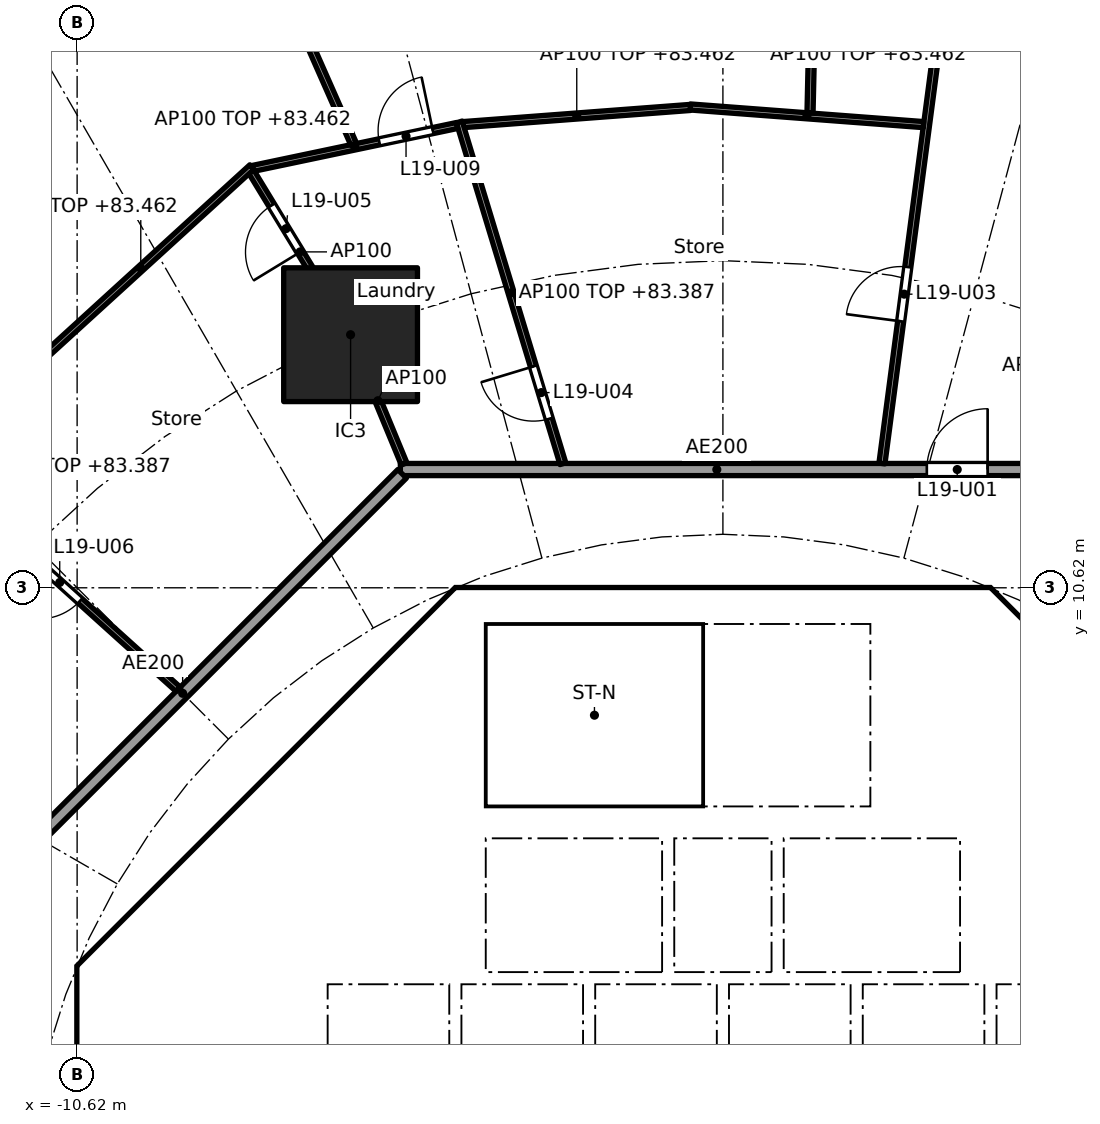
"""IFC4 building model, lengths in metres.
Left out: names, types, materials, properties, quantities, classifications, styles, units other than length and angle.
Written with IfcOpenShell. Run it as: python <this file> out.ifc"""

import sys

from ifc_helpers import new_model, si_unit, direction, frame, frame_2d, origin, origin_2d, place, context, subcontext, project, spatial, polyline, rectangle, outline, extrude, element, fill, save


model = new_model("IFC4")
c1 = context("Model", 3, precision=1e-05, world=origin(), true_north=direction((0.0, 1.0)))
c2 = subcontext(c1, "Body", "Model", "MODEL_VIEW")
j1 = project(units=[si_unit("LENGTHUNIT", "METRE"), si_unit("PLANEANGLEUNIT", "RADIAN")], contexts=[c1])
p1 = place(None, origin())
s1 = spatial("IfcSite", under=j1, at=p1, CompositionType="ELEMENT")
p2 = place(p1, origin())
s2 = spatial("IfcBuilding", under=s1, at=p2, CompositionType="ELEMENT")
p3 = place(p2, frame((0.0, 0.0, 80.7)))
s3 = spatial("IfcBuildingStorey", under=s2, at=p3, CompositionType="ELEMENT", Elevation=80.7)
p4 = place(p3, frame((-6.123, 14.782, 0.0), z_axis=(0.0, 0.0, 1.0), x_axis=(1.0, 0.0, 0.0)))
e1 = element("IfcColumn", 1, at=p4, inside=s3, PredefinedType="COLUMN", context=c2, shape_type="SweptSolid", body=[
    extrude(rectangle(XDim=2.2, YDim=2.2, at=origin_2d()), origin(), (0.0, 0.0, 1.0), 3.7),
])
p5 = place(p3, frame((9.988, 4.613, 0.0), z_axis=(0.0, 0.0, 1.0), x_axis=(-0.707106781187, 0.707106781187, 0.0)))
e2 = element("IfcWall", 2, at=p5, inside=s3, PredefinedType="SHEAR", context=c2, shape_type="SweptSolid", body=[
    extrude(rectangle(XDim=7.602, YDim=0.6, at=frame_2d((3.801, 0.0))), origin(), (0.0, 0.0, 1.0), 3.44),
])
p6 = place(p5, frame((3.201, 0.0, 0.0)))
e3 = element("IfcOpeningElement", 3, at=p6, cuts=e2, PredefinedType="OPENING", context=c2, shape_type="SweptSolid", body=[
    extrude(rectangle(XDim=1.2, YDim=2.1, at=frame_2d((0.6, 1.05))), frame((0.0, 0.31, 0.0), z_axis=(0.0, -1.0, 0.0), x_axis=(1.0, 0.0, 0.0)), (0.0, 0.0, 1.0), 0.62),
])
p7 = place(p3, frame((-4.613, 9.988, 0.0), z_axis=(0.0, 0.0, 1.0), x_axis=(-0.707106781187, -0.707106781187, 0.0)))
e4 = element("IfcWall", 4, at=p7, inside=s3, PredefinedType="SHEAR", context=c2, shape_type="SweptSolid", body=[
    extrude(rectangle(XDim=7.602, YDim=0.6, at=frame_2d((3.801, 0.0))), origin(), (0.0, 0.0, 1.0), 3.44),
])
p8 = place(p7, frame((0.351, 0.0, 0.0)))
e5 = element("IfcOpeningElement", 5, at=p8, cuts=e4, PredefinedType="OPENING", context=c2, shape_type="SweptSolid", body=[
    extrude(rectangle(XDim=1.1, YDim=2.1, at=frame_2d((0.55, 1.05))), frame((0.0, 0.31, 0.0), z_axis=(0.0, -1.0, 0.0), x_axis=(1.0, 0.0, 0.0)), (0.0, 0.0, 1.0), 0.62),
])
p9 = place(p3, frame((-10.325, 3.801, 0.0), z_axis=(0.0, 0.0, 1.0), x_axis=(0.0, -1.0, 0.0)))
e6 = element("IfcWall", 6, at=p9, inside=s3, PredefinedType="SHEAR", context=c2, shape_type="SweptSolid", body=[
    extrude(rectangle(XDim=7.602, YDim=0.6, at=frame_2d((3.801, 0.0))), origin(), (0.0, 0.0, 1.0), 3.44),
])
p10 = place(p9, frame((0.651, 0.0, 0.0)))
e7 = element("IfcOpeningElement", 7, at=p10, cuts=e6, PredefinedType="OPENING", context=c2, shape_type="SweptSolid", body=[
    extrude(rectangle(XDim=1.5, YDim=2.1, at=frame_2d((0.75, 1.05))), frame((0.0, 0.31, 0.0), z_axis=(0.0, -1.0, 0.0), x_axis=(1.0, 0.0, 0.0)), (0.0, 0.0, 1.0), 0.62),
])
p11 = place(p9, frame((5.451, 0.0, 0.0)))
e8 = element("IfcOpeningElement", 8, at=p11, cuts=e6, PredefinedType="OPENING", context=c2, shape_type="SweptSolid", body=[
    extrude(rectangle(XDim=1.5, YDim=2.1, at=frame_2d((0.75, 1.05))), frame((0.0, 0.31, 0.0), z_axis=(0.0, -1.0, 0.0), x_axis=(1.0, 0.0, 0.0)), (0.0, 0.0, 1.0), 0.62),
])
p12 = place(p3, frame((-5.8, 4.3, 0.0), z_axis=(0.0, 0.0, 1.0), x_axis=(0.0, 1.0, 0.0)))
e9 = element("IfcWall", 9, at=p12, inside=s3, PredefinedType="PARTITIONING", context=c2, shape_type="SweptSolid", body=[
    extrude(rectangle(XDim=3.927, YDim=0.15, at=frame_2d((1.963, 0.0))), origin(), (0.0, 0.0, 1.0), 3.44),
])
p13 = place(p12, frame((1.551, 0.0, 0.0)))
e10 = element("IfcOpeningElement", 10, at=p13, cuts=e9, PredefinedType="OPENING", context=c2, shape_type="SweptSolid", body=[
    extrude(rectangle(XDim=0.9, YDim=2.1, at=frame_2d((0.45, 1.05))), frame((0.0, 0.085, 0.0), z_axis=(0.0, -1.0, 0.0), x_axis=(1.0, 0.0, 0.0)), (0.0, 0.0, 1.0), 0.17),
])
p14 = place(p3, frame((4.0, 4.3, 0.0), z_axis=(0.0, 0.0, 1.0), x_axis=(0.0, 1.0, 0.0)))
e11 = element("IfcWall", 11, at=p14, inside=s3, PredefinedType="SOLIDWALL", context=c2, shape_type="SweptSolid", body=[
    extrude(rectangle(XDim=2.2, YDim=0.2, at=frame_2d((1.1, 0.0))), origin(), (0.0, 0.0, 1.0), 3.44),
])
p15 = place(p14, frame((0.55, 0.0, 0.0)))
e12 = element("IfcOpeningElement", 12, at=p15, cuts=e11, PredefinedType="OPENING", context=c2, shape_type="SweptSolid", body=[
    extrude(rectangle(XDim=1.1, YDim=2.1, at=frame_2d((0.55, 1.05))), frame((0.0, 0.11, 0.0), z_axis=(0.0, -1.0, 0.0), x_axis=(1.0, 0.0, 0.0)), (0.0, 0.0, 1.0), 0.22),
])
p16 = place(p3, frame((-4.0, 4.3, 0.0), z_axis=(0.0, 0.0, 1.0), x_axis=(0.0, 1.0, 0.0)))
e13 = element("IfcWall", 13, at=p16, inside=s3, PredefinedType="SOLIDWALL", context=c2, shape_type="SweptSolid", body=[
    extrude(rectangle(XDim=2.2, YDim=0.2, at=frame_2d((1.1, 0.0))), origin(), (0.0, 0.0, 1.0), 3.44),
])
p17 = place(p16, frame((0.55, 0.0, 0.0)))
e14 = element("IfcOpeningElement", 14, at=p17, cuts=e13, PredefinedType="OPENING", context=c2, shape_type="SweptSolid", body=[
    extrude(rectangle(XDim=1.1, YDim=2.1, at=frame_2d((0.55, 1.05))), frame((0.0, 0.11, 0.0), z_axis=(0.0, -1.0, 0.0), x_axis=(1.0, 0.0, 0.0)), (0.0, 0.0, 1.0), 0.22),
])
p18 = place(p3, frame((4.0, 7.025, 0.0), z_axis=(0.0, 0.0, 1.0), x_axis=(0.0, 1.0, 0.0)))
e15 = element("IfcWall", 15, at=p18, inside=s3, PredefinedType="SOLIDWALL", context=c2, shape_type="SweptSolid", body=[
    extrude(rectangle(XDim=3.0, YDim=0.2, at=frame_2d((1.5, 0.0))), origin(), (0.0, 0.0, 1.0), 3.44),
])
p19 = place(p18, frame((0.925, 0.0, 0.0)))
e16 = element("IfcOpeningElement", 16, at=p19, cuts=e15, PredefinedType="OPENING", context=c2, shape_type="SweptSolid", body=[
    extrude(rectangle(XDim=1.1, YDim=2.1, at=frame_2d((0.55, 1.05))), frame((0.0, 0.11, 0.0), z_axis=(0.0, -1.0, 0.0), x_axis=(1.0, 0.0, 0.0)), (0.0, 0.0, 1.0), 0.22),
])
p20 = place(p3, origin())
e17 = element("IfcWall", 17, at=p20, inside=s3, PredefinedType="SHEAR", context=c2, shape_type="SweptSolid", body=[
    extrude(outline(polyline([(-10.2, 4.825), (-9.776, 4.401), (-10.025, 4.152), (-10.025, 3.801), (-10.625, 3.801), (-10.625, 4.401), (-10.2, 4.825)])), origin(), (0.0, 0.0, 1.0), 3.44),
])
p21 = place(p3, origin())
e18 = element("IfcWall", 18, at=p21, inside=s3, PredefinedType="SHEAR", context=c2, shape_type="SweptSolid", body=[
    extrude(outline(polyline([(-4.152, 10.025), (-4.401, 9.776), (-4.825, 10.2), (-4.401, 10.625), (4.401, 10.625), (4.825, 10.2), (4.401, 9.776), (4.152, 10.025), (-4.152, 10.025)])), origin(), (0.0, 0.0, 1.0), 3.44),
])
for number, where, z_axis, x_axis in (
    (19, (-0.9, 4.3, 0.0), (0.0, 0.0, 1.0), (0.0, 1.0, 0.0)),
    (20, (0.9, 4.3, 0.0), (0.0, 0.0, 1.0), (0.0, 1.0, 0.0)),
):
    element("IfcWall", number, at=place(p3, frame(where, z_axis=z_axis, x_axis=x_axis)), inside=s3, PredefinedType="SOLIDWALL", context=c2, shape_type="SweptSolid", body=[
        extrude(rectangle(XDim=2.2, YDim=0.2, at=frame_2d((1.1, 0.0))), origin(), (0.0, 0.0, 1.0), 3.44),
    ])
p22 = place(p3, origin())
e21 = element("IfcWall", 21, at=p22, inside=s3, PredefinedType="SOLIDWALL", context=c2, shape_type="SweptSolid", body=[
    extrude(outline(polyline([(-6.5, 2.1), (-6.7, 2.1), (-6.7, 4.3), (6.7, 4.3), (6.7, 2.1), (6.5, 2.1), (6.5, 4.1), (4.5, 4.1), (4.5, 2.1), (4.3, 2.1), (4.3, 4.1), (2.3, 4.1), (2.3, 2.1), (2.1, 2.1), (2.1, 4.1), (0.1, 4.1), (0.1, 2.1), (-0.1, 2.1), (-0.1, 4.1), (-2.1, 4.1), (-2.1, 2.1), (-2.3, 2.1), (-2.3, 4.1), (-4.3, 4.1), (-4.3, 2.1), (-4.5, 2.1), (-4.5, 4.1), (-6.5, 4.1), (-6.5, 2.1)])), origin(), (0.0, 0.0, 1.0), 3.44),
])
p23 = place(p3, frame((-10.025, 4.0, 0.0), z_axis=(0.0, 0.0, 1.0), x_axis=(1.0, 0.0, 0.0)))
e22 = element("IfcWall", 22, at=p23, inside=s3, PredefinedType="PARTITIONING", context=c2, shape_type="SweptSolid", body=[
    extrude(rectangle(XDim=3.325, YDim=0.2, at=frame_2d((1.662, 0.0))), origin(), (0.0, 0.0, 1.0), 3.44),
])
p24 = place(p3, origin())
e23 = element("IfcWall", 23, at=p24, inside=s3, PredefinedType="SOLIDWALL", context=c2, shape_type="SweptSolid", body=[
    extrude(outline(polyline([(-3.9, 7.025), (-4.1, 7.025), (-4.1, 10.025), (-3.9, 10.025), (-3.9, 7.025)])), origin(), (0.0, 0.0, 1.0), 3.44),
])
p25 = place(p3, origin())
e24 = element("IfcWall", 24, at=p25, inside=s3, PredefinedType="SOLIDWALL", context=c2, shape_type="SweptSolid", body=[
    extrude(outline(polyline([(4.1, 6.5), (-4.1, 6.5), (-4.1, 7.025), (4.1, 7.025), (4.1, 6.5)])), origin(), (0.0, 0.0, 1.0), 3.44),
])
p26 = place(p3, frame((5.104, 12.565, 0.0), z_axis=(0.0, 0.0, 1.0), x_axis=(-1.0, 0.0, 0.0)))
e25 = element("IfcWall", 25, at=p26, inside=s3, PredefinedType="PARTITIONING", context=c2, shape_type="SweptSolid", body=[
    extrude(rectangle(XDim=10.409, YDim=0.2, at=frame_2d((5.205, 0.0))), origin(), (0.0, 0.0, 1.0), 3.44),
])
p27 = place(p26, frame((0.751, 0.0, 0.0)))
e26 = element("IfcOpeningElement", 26, at=p27, cuts=e25, PredefinedType="OPENING", context=c2, shape_type="SweptSolid", body=[
    extrude(rectangle(XDim=1.0, YDim=2.1, at=frame_2d((0.5, 1.05))), frame((0.0, 0.11, 0.0), z_axis=(0.0, -1.0, 0.0), x_axis=(1.0, 0.0, 0.0)), (0.0, 0.0, 1.0), 0.22),
])
p28 = place(p3, frame((-5.275, 12.494, 0.0), z_axis=(0.0, 0.0, 1.0), x_axis=(-0.707106781187, -0.707106781187, 0.0)))
e27 = element("IfcWall", 27, at=p28, inside=s3, PredefinedType="PARTITIONING", context=c2, shape_type="SweptSolid", body=[
    extrude(rectangle(XDim=10.209, YDim=0.2, at=frame_2d((5.104, 0.0))), origin(), (0.0, 0.0, 1.0), 3.44),
])
p29 = place(p3, frame((2.615, 12.664, 0.0), z_axis=(0.0, 0.0, 1.0), x_axis=(0.130614967904, 0.99143316979, 0.0)))
e28 = element("IfcWall", 28, at=p29, inside=s3, PredefinedType="PARTITIONING", context=c2, shape_type="SweptSolid", body=[
    extrude(rectangle(XDim=20.034, YDim=0.1, at=frame_2d((10.017, 0.0))), origin(), (0.0, 0.0, 1.0), 2.687),
])
p30 = place(p29, frame((2.359, 0.0, 0.0)))
e29 = element("IfcOpeningElement", 29, at=p30, cuts=e28, PredefinedType="OPENING", context=c2, shape_type="SweptSolid", body=[
    extrude(rectangle(XDim=0.9, YDim=2.1, at=frame_2d((0.45, 1.05))), frame((0.0, 0.06, 0.0), z_axis=(0.0, -1.0, 0.0), x_axis=(1.0, 0.0, 0.0)), (0.0, 0.0, 1.0), 0.12),
])
p31 = place(p29, frame((8.873, 0.0, 0.0)))
e30 = element("IfcOpeningElement", 30, at=p31, cuts=e28, PredefinedType="OPENING", context=c2, shape_type="SweptSolid", body=[
    extrude(rectangle(XDim=0.9, YDim=2.1, at=frame_2d((0.45, 1.05))), frame((0.0, 0.06, 0.0), z_axis=(0.0, -1.0, 0.0), x_axis=(1.0, 0.0, 0.0)), (0.0, 0.0, 1.0), 0.12),
])
p32 = place(p3, frame((3.299, 18.237, 0.0), z_axis=(0.0, 0.0, 1.0), x_axis=(-0.997152243414, 0.075414875552, 0.0)))
e31 = element("IfcWall", 31, at=p32, inside=s3, PredefinedType="PARTITIONING", context=c2, shape_type="SweptSolid", body=[
    extrude(rectangle(XDim=3.846, YDim=0.1, at=frame_2d((1.923, 0.0))), origin(), (0.0, 0.0, 1.0), 2.762),
])
p33 = place(p3, frame((1.433, 18.428, 0.0), z_axis=(0.0, 0.0, 1.0), x_axis=(0.022419421812, 0.999748653175, 0.0)))
e32 = element("IfcWall", 32, at=p33, inside=s3, PredefinedType="PARTITIONING", context=c2, shape_type="SweptSolid", body=[
    extrude(rectangle(XDim=7.438, YDim=0.1, at=frame_2d((3.719, 0.0))), origin(), (0.0, 0.0, 1.0), 3.44),
])
p34 = place(p3, frame((-0.536, 18.519, 0.0), z_axis=(0.0, 0.0, 1.0), x_axis=(-0.99715294352, -0.075405618017, 0.0)))
e33 = element("IfcWall", 33, at=p34, inside=s3, PredefinedType="PARTITIONING", context=c2, shape_type="SweptSolid", body=[
    extrude(rectangle(XDim=3.746, YDim=0.1, at=frame_2d((1.873, 0.0))), origin(), (0.0, 0.0, 1.0), 2.762),
])
p35 = place(p3, frame((-2.631, 12.66, 0.0), z_axis=(0.0, 0.0, 1.0), x_axis=(-0.290145836284, 0.956982441682, 0.0)))
e34 = element("IfcWall", 34, at=p35, inside=s3, PredefinedType="PARTITIONING", context=c2, shape_type="SweptSolid", body=[
    extrude(rectangle(XDim=5.873, YDim=0.1, at=frame_2d((2.937, 0.0))), origin(), (0.0, 0.0, 1.0), 2.687),
])
p36 = place(p35, frame((0.772, 0.0, 0.0)))
e35 = element("IfcOpeningElement", 35, at=p36, cuts=e34, PredefinedType="OPENING", context=c2, shape_type="SweptSolid", body=[
    extrude(rectangle(XDim=0.9, YDim=2.1, at=frame_2d((0.45, 1.05))), frame((0.0, 0.06, 0.0), z_axis=(0.0, -1.0, 0.0), x_axis=(1.0, 0.0, 0.0)), (0.0, 0.0, 1.0), 0.12),
])
p37 = place(p3, frame((-4.37, 18.223, 0.0), z_axis=(0.0, 0.0, 1.0), x_axis=(-0.978619056583, -0.205681166112, 0.0)))
e36 = element("IfcWall", 36, at=p37, inside=s3, PredefinedType="PARTITIONING", context=c2, shape_type="SweptSolid", body=[
    extrude(rectangle(XDim=3.438, YDim=0.1, at=frame_2d((1.719, 0.0))), origin(), (0.0, 0.0, 1.0), 2.762),
])
p38 = place(p37, frame((0.409, 0.0, 0.0)))
e37 = element("IfcOpeningElement", 37, at=p38, cuts=e36, PredefinedType="OPENING", context=c2, shape_type="SweptSolid", body=[
    extrude(rectangle(XDim=0.9, YDim=2.1, at=frame_2d((0.45, 1.05))), frame((0.0, 0.06, 0.0), z_axis=(0.0, -1.0, 0.0), x_axis=(1.0, 0.0, 0.0)), (0.0, 0.0, 1.0), 0.12),
])
p39 = place(p3, frame((-6.072, 17.915, 0.0), z_axis=(0.0, 0.0, 1.0), x_axis=(-0.404139814253, 0.914697223422, 0.0)))
e38 = element("IfcWall", 38, at=p39, inside=s3, PredefinedType="PARTITIONING", context=c2, shape_type="SweptSolid", body=[
    extrude(rectangle(XDim=15.614, YDim=0.1, at=frame_2d((7.807, 0.0))), origin(), (0.0, 0.0, 1.0), 2.837),
])
p40 = place(p39, frame((3.226, 0.0, 0.0)))
e39 = element("IfcOpeningElement", 39, at=p40, cuts=e38, PredefinedType="OPENING", context=c2, shape_type="SweptSolid", body=[
    extrude(rectangle(XDim=0.9, YDim=2.1, at=frame_2d((0.45, 1.05))), frame((0.0, 0.06, 0.0), z_axis=(0.0, -1.0, 0.0), x_axis=(1.0, 0.0, 0.0)), (0.0, 0.0, 1.0), 0.12),
])
p41 = place(p3, frame((-5.243, 12.657, 0.0), z_axis=(0.0, 0.0, 1.0), x_axis=(-0.382703272338, 0.923871314276, 0.0)))
e40 = element("IfcWall", 40, at=p41, inside=s3, PredefinedType="PARTITIONING", context=c2, shape_type="SweptSolid", body=[
    extrude(rectangle(XDim=2.249, YDim=0.1, at=frame_2d((1.125, 0.0))), origin(), (0.0, 0.0, 1.0), 3.44),
])
p42 = place(p3, frame((-6.149, 14.825, 0.0), z_axis=(0.0, 0.0, 1.0), x_axis=(-0.520433196839, 0.853902387646, 0.0)))
e41 = element("IfcWall", 41, at=p42, inside=s3, PredefinedType="PARTITIONING", context=c2, shape_type="SweptSolid", body=[
    extrude(rectangle(XDim=3.09, YDim=0.1, at=frame_2d((1.545, 0.0))), origin(), (0.0, 0.0, 1.0), 3.44),
])
p43 = place(p42, frame((1.542, 0.0, 0.0)))
e42 = element("IfcOpeningElement", 42, at=p43, cuts=e41, PredefinedType="OPENING", context=c2, shape_type="SweptSolid", body=[
    extrude(rectangle(XDim=0.9, YDim=2.1, at=frame_2d((0.45, 1.05))), frame((0.0, 0.06, 0.0), z_axis=(0.0, -1.0, 0.0), x_axis=(1.0, 0.0, 0.0)), (0.0, 0.0, 1.0), 0.12),
])
p44 = place(p3, frame((-7.746, 17.539, 0.0), z_axis=(0.0, 0.0, 1.0), x_axis=(-0.738860434967, -0.673858484877, 0.0)))
e43 = element("IfcWall", 43, at=p44, inside=s3, PredefinedType="PARTITIONING", context=c2, shape_type="SweptSolid", body=[
    extrude(rectangle(XDim=4.947, YDim=0.1, at=frame_2d((2.473, 0.0))), origin(), (0.0, 0.0, 1.0), 2.762),
])
p45 = place(p3, frame((-8.959, 8.952, 0.0), z_axis=(0.0, 0.0, 1.0), x_axis=(-0.742679904999, 0.669646592398, 0.0)))
e44 = element("IfcWall", 44, at=p45, inside=s3, PredefinedType="PARTITIONING", context=c2, shape_type="SweptSolid", body=[
    extrude(rectangle(XDim=12.121, YDim=0.1, at=frame_2d((6.061, 0.0))), origin(), (0.0, 0.0, 1.0), 2.687),
])
p46 = place(p45, frame((2.172, 0.0, 0.0)))
e45 = element("IfcOpeningElement", 45, at=p46, cuts=e44, PredefinedType="OPENING", context=c2, shape_type="SweptSolid", body=[
    extrude(rectangle(XDim=0.9, YDim=2.1, at=frame_2d((0.45, 1.05))), frame((0.0, 0.06, 0.0), z_axis=(0.0, -1.0, 0.0), x_axis=(1.0, 0.0, 0.0)), (0.0, 0.0, 1.0), 0.12),
])
p47 = place(p45, frame((8.233, 0.0, 0.0)))
e46 = element("IfcOpeningElement", 46, at=p47, cuts=e44, PredefinedType="OPENING", context=c2, shape_type="SweptSolid", body=[
    extrude(rectangle(XDim=0.9, YDim=2.1, at=frame_2d((0.45, 1.05))), frame((0.0, 0.06, 0.0), z_axis=(0.0, -1.0, 0.0), x_axis=(1.0, 0.0, 0.0)), (0.0, 0.0, 1.0), 0.12),
])
p48 = place(p15, origin())
e47 = element("IfcDoor", 47, at=p48, inside=s3, OperationType="DOUBLE_DOOR_SLIDING", PredefinedType="DOOR", context=c2, shape_type="SweptSolid", body=[
    extrude(rectangle(XDim=1.1, YDim=2.1, at=frame_2d((0.55, 1.05))), frame((0.0, 0.025, 0.0), z_axis=(0.0, -1.0, 0.0), x_axis=(1.0, 0.0, 0.0)), (0.0, 0.0, 1.0), 0.05),
])
fill(e12, e47)
p49 = place(p17, origin())
e48 = element("IfcDoor", 48, at=p49, inside=s3, OperationType="DOUBLE_DOOR_SLIDING", PredefinedType="DOOR", context=c2, shape_type="SweptSolid", body=[
    extrude(rectangle(XDim=1.1, YDim=2.1, at=frame_2d((0.55, 1.05))), frame((0.0, 0.025, 0.0), z_axis=(0.0, -1.0, 0.0), x_axis=(1.0, 0.0, 0.0)), (0.0, 0.0, 1.0), 0.05),
])
fill(e14, e48)
p50 = place(p19, origin())
e49 = element("IfcDoor", 49, at=p50, inside=s3, OperationType="SINGLE_SWING_LEFT", PredefinedType="DOOR", context=c2, shape_type="SweptSolid", body=[
    extrude(rectangle(XDim=1.1, YDim=2.1, at=frame_2d((0.55, 1.05))), frame((0.0, 0.025, 0.0), z_axis=(0.0, -1.0, 0.0), x_axis=(1.0, 0.0, 0.0)), (0.0, 0.0, 1.0), 0.05),
])
fill(e16, e49)
p51 = place(p13, origin())
e50 = element("IfcDoor", 50, at=p51, inside=s3, OperationType="SINGLE_SWING_RIGHT", PredefinedType="DOOR", context=c2, shape_type="SweptSolid", body=[
    extrude(rectangle(XDim=0.9, YDim=2.1, at=frame_2d((0.45, 1.05))), frame((0.0, 0.025, 0.0), z_axis=(0.0, -1.0, 0.0), x_axis=(1.0, 0.0, 0.0)), (0.0, 0.0, 1.0), 0.05),
])
fill(e10, e50)
p52 = place(p10, origin())
e51 = element("IfcDoor", 51, at=p52, inside=s3, OperationType="DOUBLE_DOOR_SINGLE_SWING", PredefinedType="DOOR", context=c2, shape_type="SweptSolid", body=[
    extrude(rectangle(XDim=1.5, YDim=2.1, at=frame_2d((0.75, 1.05))), frame((0.0, 0.025, 0.0), z_axis=(0.0, -1.0, 0.0), x_axis=(1.0, 0.0, 0.0)), (0.0, 0.0, 1.0), 0.05),
])
fill(e7, e51)
p53 = place(p8, origin())
e52 = element("IfcDoor", 52, at=p53, inside=s3, OperationType="SINGLE_SWING_LEFT", PredefinedType="DOOR", context=c2, shape_type="SweptSolid", body=[
    extrude(rectangle(XDim=1.1, YDim=2.1, at=frame_2d((0.55, 1.05))), frame((0.0, 0.025, 0.0), z_axis=(0.0, -1.0, 0.0), x_axis=(1.0, 0.0, 0.0)), (0.0, 0.0, 1.0), 0.05),
])
fill(e5, e52)
p54 = place(p27, frame((1.0, 0.0, 0.0), x_axis=(-1.0, 0.0, 0.0)))
e53 = element("IfcDoor", 53, at=p54, inside=s3, OperationType="SINGLE_SWING_RIGHT", PredefinedType="DOOR", context=c2, shape_type="SweptSolid", body=[
    extrude(rectangle(XDim=1.0, YDim=2.1, at=frame_2d((0.5, 1.05))), frame((0.0, 0.025, 0.0), z_axis=(0.0, -1.0, 0.0), x_axis=(1.0, 0.0, 0.0)), (0.0, 0.0, 1.0), 0.05),
])
fill(e26, e53)
p55 = place(p30, origin())
e54 = element("IfcDoor", 54, at=p55, inside=s3, OperationType="SINGLE_SWING_LEFT", PredefinedType="DOOR", context=c2, shape_type="SweptSolid", body=[
    extrude(rectangle(XDim=0.9, YDim=2.1, at=frame_2d((0.45, 1.05))), frame((0.0, 0.025, 0.0), z_axis=(0.0, -1.0, 0.0), x_axis=(1.0, 0.0, 0.0)), (0.0, 0.0, 1.0), 0.05),
])
fill(e29, e54)
p56 = place(p36, origin())
e55 = element("IfcDoor", 55, at=p56, inside=s3, OperationType="SINGLE_SWING_RIGHT", PredefinedType="DOOR", context=c2, shape_type="SweptSolid", body=[
    extrude(rectangle(XDim=0.9, YDim=2.1, at=frame_2d((0.45, 1.05))), frame((0.0, 0.025, 0.0), z_axis=(0.0, -1.0, 0.0), x_axis=(1.0, 0.0, 0.0)), (0.0, 0.0, 1.0), 0.05),
])
fill(e35, e55)
p57 = place(p43, origin())
e56 = element("IfcDoor", 56, at=p57, inside=s3, OperationType="SINGLE_SWING_LEFT", PredefinedType="DOOR", context=c2, shape_type="SweptSolid", body=[
    extrude(rectangle(XDim=0.9, YDim=2.1, at=frame_2d((0.45, 1.05))), frame((0.0, 0.025, 0.0), z_axis=(0.0, -1.0, 0.0), x_axis=(1.0, 0.0, 0.0)), (0.0, 0.0, 1.0), 0.05),
])
fill(e42, e56)
p58 = place(p46, origin())
e57 = element("IfcDoor", 57, at=p58, inside=s3, OperationType="SINGLE_SWING_RIGHT", PredefinedType="DOOR", context=c2, shape_type="SweptSolid", body=[
    extrude(rectangle(XDim=0.9, YDim=2.1, at=frame_2d((0.45, 1.05))), frame((0.0, 0.025, 0.0), z_axis=(0.0, -1.0, 0.0), x_axis=(1.0, 0.0, 0.0)), (0.0, 0.0, 1.0), 0.05),
])
fill(e45, e57)
p59 = place(p38, frame((0.9, 0.0, 0.0), x_axis=(-1.0, 0.0, 0.0)))
e58 = element("IfcDoor", 58, at=p59, inside=s3, OperationType="SINGLE_SWING_RIGHT", PredefinedType="DOOR", context=c2, shape_type="SweptSolid", body=[
    extrude(rectangle(XDim=0.9, YDim=2.1, at=frame_2d((0.45, 1.05))), frame((0.0, 0.025, 0.0), z_axis=(0.0, -1.0, 0.0), x_axis=(1.0, 0.0, 0.0)), (0.0, 0.0, 1.0), 0.05),
])
fill(e37, e58)
save(model, sys.argv[1])
